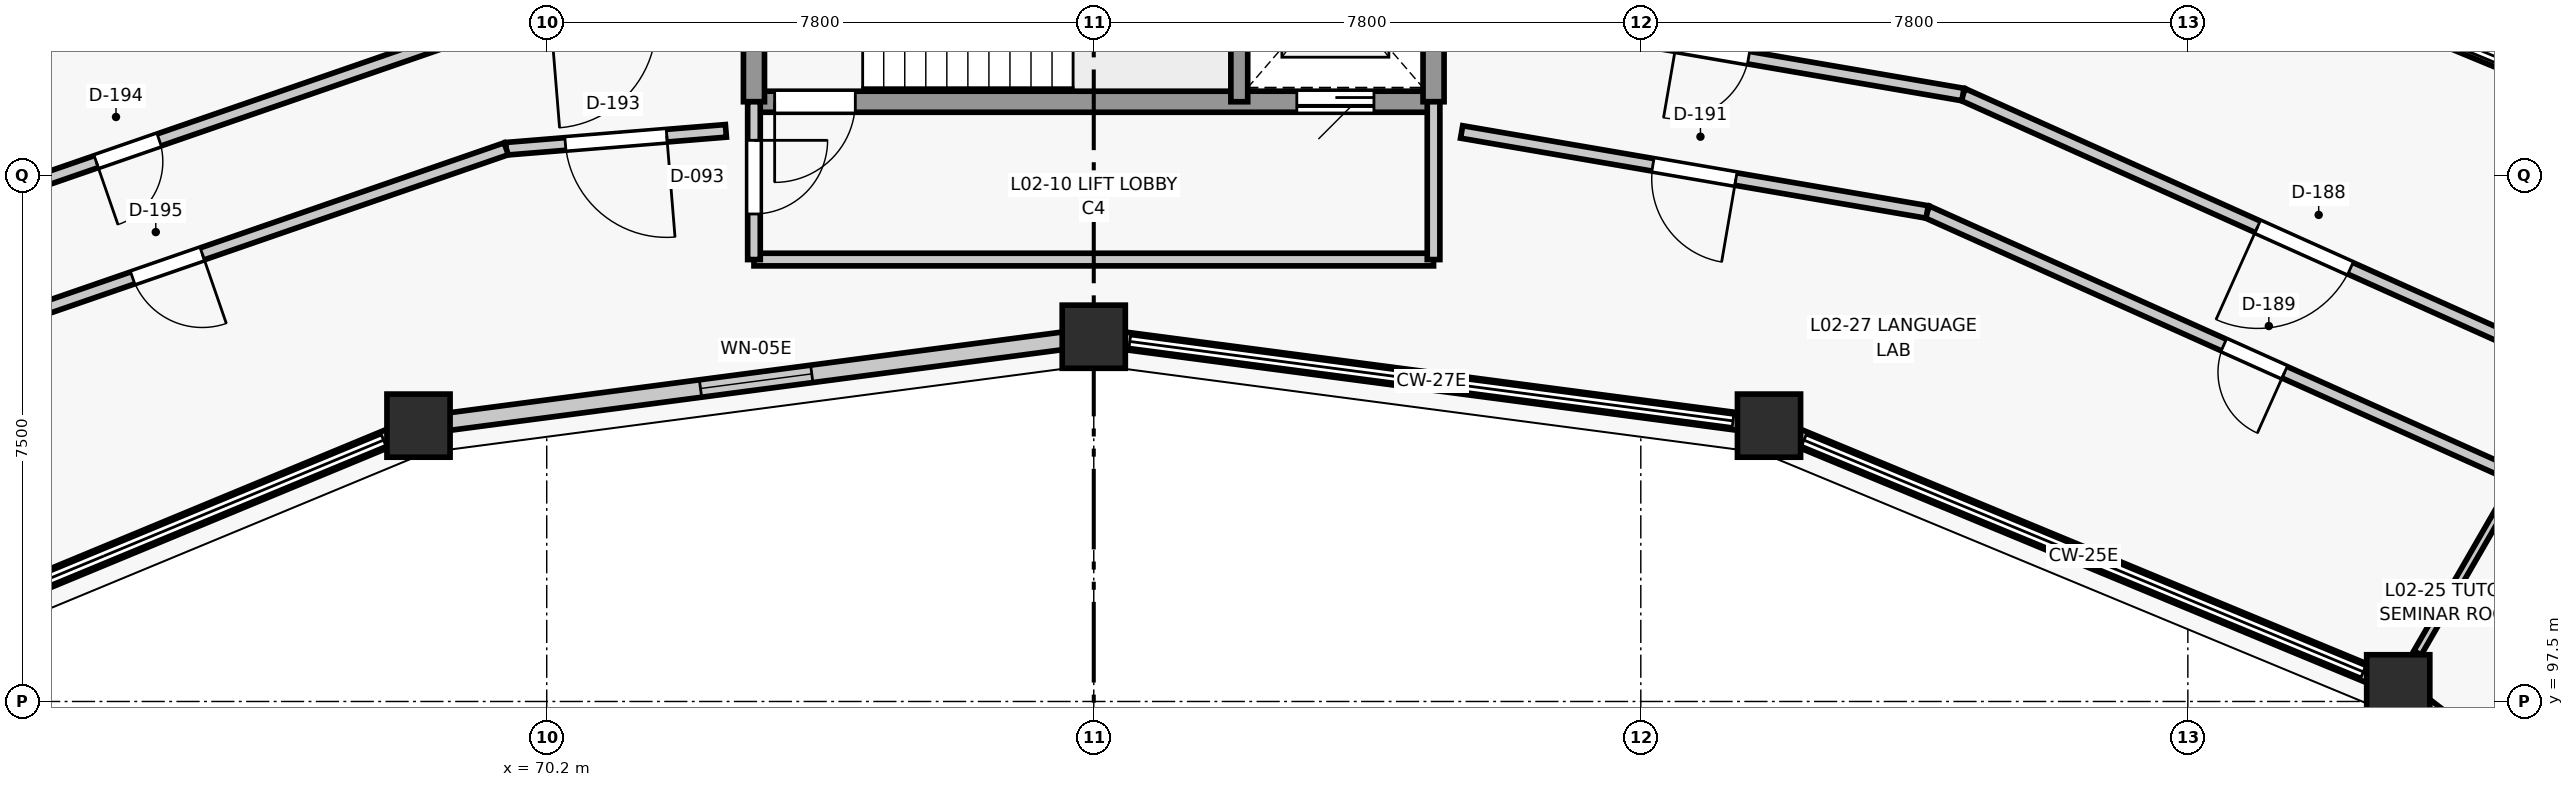
"""IFC4 building model, lengths in metres.
Left out: names, types, materials, properties, quantities, classifications, styles, units other than length and angle.
Written with IfcOpenShell. Run it as: python <this file> out.ifc"""

import sys

from ifc_helpers import new_model, si_unit, direction, frame, frame_2d, origin, origin_2d, place, context, subcontext, project, spatial, rectangle, circle, extrude, element, fill, save


model = new_model("IFC4")
c1 = context("Model", 3, precision=1e-05, world=origin(), true_north=direction((0.0, 1.0)))
c2 = subcontext(c1, "Body", "Model", "MODEL_VIEW")
j1 = project(units=[si_unit("LENGTHUNIT", "METRE"), si_unit("PLANEANGLEUNIT", "RADIAN")], contexts=[c1])
p1 = place(None, origin())
s1 = spatial("IfcSite", under=j1, at=p1, CompositionType="ELEMENT")
p2 = place(p1, origin())
s2 = spatial("IfcBuilding", under=s1, at=p2, CompositionType="ELEMENT")
p3 = place(p2, frame((0.0, 0.0, 8.7)))
s3 = spatial("IfcBuildingStorey", under=s2, at=p3, CompositionType="ELEMENT", Elevation=8.7)
for number, where, z_axis, x_axis in (
    (1, (96.6, 97.716, 0.0), (0.0, 0.0, 1.0), (1.0, 0.0, 0.0)),
    (2, (87.628, 101.432, 0.0), (0.0, 0.0, 1.0), (1.0, 0.0, 0.0)),
    (3, (78.0, 102.7, 0.0), (0.0, 0.0, 1.0), (1.0, 0.0, 0.0)),
    (4, (68.372, 101.432, 0.0), (0.0, 0.0, 1.0), (1.0, 0.0, 0.0)),
):
    element("IfcColumn", number, at=place(p3, frame(where, z_axis=z_axis, x_axis=x_axis)), inside=s3, PredefinedType="COLUMN", context=c2, shape_type="SweptSolid", body=[
        extrude(circle(Radius=0.45, at=origin_2d()), origin(), (0.0, 0.0, 1.0), 3.9),
    ])
p4 = place(p3, frame((104.024, 92.019, 0.0), z_axis=(0.0, 0.0, 1.0), x_axis=(-0.793347085527, 0.608769580289, 0.0)))
e5 = element("IfcWall", 5, at=p4, inside=s3, PredefinedType="STANDARD", context=c2, shape_type="SweptSolid", body=[
    extrude(rectangle(XDim=9.005, YDim=0.25, at=frame_2d((4.502, 0.0))), origin(), (0.0, 0.0, 1.0), 2.79),
])
p5 = place(p3, frame((90.283, 109.883, 0.0), z_axis=(0.0, 0.0, 1.0), x_axis=(0.923883530636, -0.382673779896, 0.0)))
e6 = element("IfcWall", 6, at=p5, inside=s3, PredefinedType="STANDARD", context=c2, shape_type="SweptSolid", body=[
    extrude(rectangle(XDim=11.272, YDim=0.28, at=frame_2d((5.636, 0.0))), origin(), (0.0, 0.0, 1.0), 0.82),
])
p6 = place(p3, frame((96.323, 97.831, 0.0), z_axis=(0.0, 0.0, 1.0), x_axis=(-0.923880324771, 0.382681519675, 0.0)))
e7 = element("IfcWall", 7, at=p6, inside=s3, PredefinedType="STANDARD", context=c2, shape_type="SweptSolid", body=[
    extrude(rectangle(XDim=9.112, YDim=0.25, at=frame_2d((4.556, 0.0))), origin(), (0.0, 0.0, 1.0), 0.82),
])
p7 = place(p3, frame((87.353, 101.469, 0.0), z_axis=(0.0, 0.0, 1.0), x_axis=(-0.991441766434, 0.130549698469, 0.0)))
e8 = element("IfcWall", 8, at=p7, inside=s3, PredefinedType="STANDARD", context=c2, shape_type="SweptSolid", body=[
    extrude(rectangle(XDim=9.156, YDim=0.25, at=frame_2d((4.578, 0.0))), origin(), (0.0, 0.0, 1.0), 0.82),
])
p8 = place(p3, frame((77.725, 102.664, 0.0), z_axis=(0.0, 0.0, 1.0), x_axis=(-0.991441766434, -0.130549698469, 0.0)))
e9 = element("IfcWall", 9, at=p8, inside=s3, PredefinedType="STANDARD", context=c2, shape_type="SweptSolid", body=[
    extrude(rectangle(XDim=9.156, YDim=0.25, at=frame_2d((4.578, 0.0))), origin(), (0.0, 0.0, 1.0), 2.79),
])
p9 = place(p8, frame((3.778, 0.0, 0.85)))
e10 = element("IfcOpeningElement", 10, at=p9, cuts=e9, PredefinedType="OPENING", context=c2, shape_type="SweptSolid", body=[
    extrude(rectangle(XDim=1.6, YDim=1.4, at=frame_2d((0.8, 0.7))), frame((0.0, 0.135, 0.0), z_axis=(0.0, -1.0, 0.0), x_axis=(1.0, 0.0, 0.0)), (0.0, 0.0, 1.0), 0.27),
])
p10 = place(p3, frame((55.302, 105.57, 0.0), z_axis=(0.0, 0.0, 1.0), x_axis=(0.923883530636, 0.382673779896, 0.0)))
e11 = element("IfcWall", 11, at=p10, inside=s3, PredefinedType="STANDARD", context=c2, shape_type="SweptSolid", body=[
    extrude(rectangle(XDim=11.272, YDim=0.28, at=frame_2d((5.636, 0.0))), origin(), (0.0, 0.0, 1.0), 2.706),
])
p11 = place(p10, frame((4.736, 0.0, 0.85)))
e12 = element("IfcOpeningElement", 12, at=p11, cuts=e11, PredefinedType="OPENING", context=c2, shape_type="SweptSolid", body=[
    extrude(rectangle(XDim=1.8, YDim=1.4, at=frame_2d((0.9, 0.7))), frame((0.0, 0.15, 0.0), z_axis=(0.0, -1.0, 0.0), x_axis=(1.0, 0.0, 0.0)), (0.0, 0.0, 1.0), 0.3),
])
p12 = place(p3, frame((68.095, 101.318, 0.0), z_axis=(0.0, 0.0, 1.0), x_axis=(-0.923880324771, -0.382681519675, 0.0)))
e13 = element("IfcWall", 13, at=p12, inside=s3, PredefinedType="STANDARD", context=c2, shape_type="SweptSolid", body=[
    extrude(rectangle(XDim=9.112, YDim=0.25, at=frame_2d((4.556, 0.0))), origin(), (0.0, 0.0, 1.0), 0.82),
])
p13 = place(p3, frame((82.845, 106.05, 0.0), z_axis=(0.0, 0.0, 1.0), x_axis=(-1.0, 0.0, 0.0)))
e14 = element("IfcWall", 14, at=p13, inside=s3, PredefinedType="SHEAR", context=c2, shape_type="SweptSolid", body=[
    extrude(rectangle(XDim=9.69, YDim=0.3, at=frame_2d((4.845, 0.0))), origin(), (0.0, 0.0, 1.0), 3.9),
])
p14 = place(p13, frame((8.245, 0.0, 0.0)))
e15 = element("IfcOpeningElement", 15, at=p14, cuts=e14, PredefinedType="OPENING", context=c2, shape_type="SweptSolid", body=[
    extrude(rectangle(XDim=1.15, YDim=2.15, at=frame_2d((0.575, 1.075))), frame((0.0, 0.16, 0.0), z_axis=(0.0, -1.0, 0.0), x_axis=(1.0, 0.0, 0.0)), (0.0, 0.0, 1.0), 0.32),
])
p15 = place(p13, frame((0.85, 0.0, 0.0)))
e16 = element("IfcOpeningElement", 16, at=p15, cuts=e14, PredefinedType="OPENING", context=c2, shape_type="SweptSolid", body=[
    extrude(rectangle(XDim=1.1, YDim=2.15, at=frame_2d((0.55, 1.075))), frame((0.0, 0.16, 0.0), z_axis=(0.0, -1.0, 0.0), x_axis=(1.0, 0.0, 0.0)), (0.0, 0.0, 1.0), 0.32),
])
for number, where, z_axis, x_axis in (
    (17, (73.155, 106.05, 0.0), (0.0, 0.0, 1.0), (0.0, 1.0, 0.0)),
    (18, (82.845, 109.35, 0.0), (0.0, 0.0, 1.0), (0.0, -1.0, 0.0)),
):
    element("IfcWall", number, at=place(p3, frame(where, z_axis=z_axis, x_axis=x_axis)), inside=s3, PredefinedType="SHEAR", context=c2, shape_type="SweptSolid", body=[
        extrude(rectangle(XDim=3.3, YDim=0.3, at=frame_2d((1.65, 0.0))), origin(), (0.0, 0.0, 1.0), 3.9),
    ])
p16 = place(p3, frame((80.075, 106.05, 0.0), z_axis=(0.0, 0.0, 1.0), x_axis=(0.0, 1.0, 0.0)))
e19 = element("IfcWall", 19, at=p16, inside=s3, PredefinedType="SHEAR", context=c2, shape_type="SweptSolid", body=[
    extrude(rectangle(XDim=3.3, YDim=0.24, at=frame_2d((1.65, 0.0))), origin(), (0.0, 0.0, 1.0), 3.9),
])
p17 = place(p3, frame((73.155, 103.8, 0.0), z_axis=(0.0, 0.0, 1.0), x_axis=(1.0, 0.0, 0.0)))
e20 = element("IfcWall", 20, at=p17, inside=s3, PredefinedType="PARTITIONING", context=c2, shape_type="SweptSolid", body=[
    extrude(rectangle(XDim=9.69, YDim=0.18, at=frame_2d((4.845, 0.0))), origin(), (0.0, 0.0, 1.0), 3.495),
])
p18 = place(p3, frame((73.155, 106.05, 0.0), z_axis=(0.0, 0.0, 1.0), x_axis=(0.0, -1.0, 0.0)))
e21 = element("IfcWall", 21, at=p18, inside=s3, PredefinedType="PARTITIONING", context=c2, shape_type="SweptSolid", body=[
    extrude(rectangle(XDim=2.25, YDim=0.18, at=frame_2d((1.125, 0.0))), origin(), (0.0, 0.0, 1.0), 3.495),
])
p19 = place(p18, frame((0.55, 0.0, 0.0)))
e22 = element("IfcOpeningElement", 22, at=p19, cuts=e21, PredefinedType="OPENING", context=c2, shape_type="SweptSolid", body=[
    extrude(rectangle(XDim=1.05, YDim=2.1, at=frame_2d((0.525, 1.05))), frame((0.0, 0.1, 0.0), z_axis=(0.0, -1.0, 0.0), x_axis=(1.0, 0.0, 0.0)), (0.0, 0.0, 1.0), 0.2),
])
p20 = place(p3, frame((82.845, 106.05, 0.0), z_axis=(0.0, 0.0, 1.0), x_axis=(0.0, -1.0, 0.0)))
e23 = element("IfcWall", 23, at=p20, inside=s3, PredefinedType="PARTITIONING", context=c2, shape_type="SweptSolid", body=[
    extrude(rectangle(XDim=2.25, YDim=0.18, at=frame_2d((1.125, 0.0))), origin(), (0.0, 0.0, 1.0), 3.495),
])
p21 = place(p3, frame((100.12, 101.79, 0.0), z_axis=(0.0, 0.0, 1.0), x_axis=(-0.912414084207, 0.409268297015, 0.0)))
e24 = element("IfcWall", 24, at=p21, inside=s3, PredefinedType="PARTITIONING", context=c2, shape_type="SweptSolid", body=[
    extrude(rectangle(XDim=10.66, YDim=0.18, at=frame_2d((5.33, 0.0))), origin(), (0.0, 0.0, 1.0), 3.495),
])
p22 = place(p21, frame((4.605, 0.0, 0.0)))
e25 = element("IfcOpeningElement", 25, at=p22, cuts=e24, PredefinedType="OPENING", context=c2, shape_type="SweptSolid", body=[
    extrude(rectangle(XDim=1.45, YDim=2.2, at=frame_2d((0.725, 1.1))), frame((0.0, 0.1, 0.0), z_axis=(0.0, -1.0, 0.0), x_axis=(1.0, 0.0, 0.0)), (0.0, 0.0, 1.0), 0.2),
])
p23 = place(p3, frame((99.209, 100.296, 0.0), z_axis=(0.0, 0.0, 1.0), x_axis=(-0.912404455482, 0.409289762414, 0.0)))
e26 = element("IfcWall", 26, at=p23, inside=s3, PredefinedType="PARTITIONING", context=c2, shape_type="SweptSolid", body=[
    extrude(rectangle(XDim=10.221, YDim=0.18, at=frame_2d((5.11, 0.0))), origin(), (0.0, 0.0, 1.0), 3.495),
])
p24 = place(p23, frame((4.635, 0.0, 0.0)))
e27 = element("IfcOpeningElement", 27, at=p24, cuts=e26, PredefinedType="OPENING", context=c2, shape_type="SweptSolid", body=[
    extrude(rectangle(XDim=0.95, YDim=2.1, at=frame_2d((0.475, 1.05))), frame((0.0, 0.1, 0.0), z_axis=(0.0, -1.0, 0.0), x_axis=(1.0, 0.0, 0.0)), (0.0, 0.0, 1.0), 0.2),
])
p25 = place(p3, frame((90.394, 106.153, 0.0), z_axis=(0.0, 0.0, 1.0), x_axis=(-0.985557318444, 0.169342174491, 0.0)))
e28 = element("IfcWall", 28, at=p25, inside=s3, PredefinedType="PARTITIONING", context=c2, shape_type="SweptSolid", body=[
    extrude(rectangle(XDim=7.253, YDim=0.18, at=frame_2d((3.626, 0.0))), origin(), (0.0, 0.0, 1.0), 3.495),
])
p26 = place(p25, frame((3.102, 0.0, 0.0)))
e29 = element("IfcOpeningElement", 29, at=p26, cuts=e28, PredefinedType="OPENING", context=c2, shape_type="SweptSolid", body=[
    extrude(rectangle(XDim=1.05, YDim=2.1, at=frame_2d((0.525, 1.05))), frame((0.0, 0.1, 0.0), z_axis=(0.0, -1.0, 0.0), x_axis=(1.0, 0.0, 0.0)), (0.0, 0.0, 1.0), 0.2),
])
p27 = place(p3, frame((89.883, 104.479, 0.0), z_axis=(0.0, 0.0, 1.0), x_axis=(-0.98556269187, 0.169310898629, 0.0)))
e30 = element("IfcWall", 30, at=p27, inside=s3, PredefinedType="PARTITIONING", context=c2, shape_type="SweptSolid", body=[
    extrude(rectangle(XDim=6.735, YDim=0.18, at=frame_2d((3.368, 0.0))), origin(), (0.0, 0.0, 1.0), 3.495),
])
p28 = place(p27, frame((2.768, 0.0, 0.0)))
e31 = element("IfcOpeningElement", 31, at=p28, cuts=e30, PredefinedType="OPENING", context=c2, shape_type="SweptSolid", body=[
    extrude(rectangle(XDim=1.2, YDim=2.15, at=frame_2d((0.6, 1.075))), frame((0.0, 0.1, 0.0), z_axis=(0.0, -1.0, 0.0), x_axis=(1.0, 0.0, 0.0)), (0.0, 0.0, 1.0), 0.2),
])
p29 = place(p3, frame((72.755, 105.635, 0.0), z_axis=(0.0, 0.0, 1.0), x_axis=(-0.996693095602, -0.081258065316, 0.0)))
e32 = element("IfcWall", 32, at=p29, inside=s3, PredefinedType="PARTITIONING", context=c2, shape_type="SweptSolid", body=[
    extrude(rectangle(XDim=3.143, YDim=0.18, at=frame_2d((1.571, 0.0))), origin(), (0.0, 0.0, 1.0), 3.495),
])
p30 = place(p29, frame((0.846, 0.0, 0.0)))
e33 = element("IfcOpeningElement", 33, at=p30, cuts=e32, PredefinedType="OPENING", context=c2, shape_type="SweptSolid", body=[
    extrude(rectangle(XDim=1.45, YDim=2.2, at=frame_2d((0.725, 1.1))), frame((0.0, 0.1, 0.0), z_axis=(0.0, -1.0, 0.0), x_axis=(1.0, 0.0, 0.0)), (0.0, 0.0, 1.0), 0.2),
])
p31 = place(p3, frame((69.263, 107.092, 0.0), z_axis=(0.0, 0.0, 1.0), x_axis=(-0.945128117061, -0.326699927059, 0.0)))
e34 = element("IfcWall", 34, at=p31, inside=s3, PredefinedType="PARTITIONING", context=c2, shape_type="SweptSolid", body=[
    extrude(rectangle(XDim=10.66, YDim=0.18, at=frame_2d((5.33, 0.0))), origin(), (0.0, 0.0, 1.0), 3.495),
])
p32 = place(p31, frame((4.855, 0.0, 0.0)))
e35 = element("IfcOpeningElement", 35, at=p32, cuts=e34, PredefinedType="OPENING", context=c2, shape_type="SweptSolid", body=[
    extrude(rectangle(XDim=0.95, YDim=2.1, at=frame_2d((0.475, 1.05))), frame((0.0, 0.1, 0.0), z_axis=(0.0, -1.0, 0.0), x_axis=(1.0, 0.0, 0.0)), (0.0, 0.0, 1.0), 0.2),
])
p33 = place(p3, frame((69.623, 105.38, 0.0), z_axis=(0.0, 0.0, 1.0), x_axis=(-0.945125986937, -0.326706089346, 0.0)))
e36 = element("IfcWall", 36, at=p33, inside=s3, PredefinedType="PARTITIONING", context=c2, shape_type="SweptSolid", body=[
    extrude(rectangle(XDim=10.221, YDim=0.18, at=frame_2d((5.111, 0.0))), origin(), (0.0, 0.0, 1.0), 3.495),
])
p34 = place(p33, frame((4.586, 0.0, 0.0)))
e37 = element("IfcOpeningElement", 37, at=p34, cuts=e36, PredefinedType="OPENING", context=c2, shape_type="SweptSolid", body=[
    extrude(rectangle(XDim=1.05, YDim=2.1, at=frame_2d((0.525, 1.05))), frame((0.0, 0.1, 0.0), z_axis=(0.0, -1.0, 0.0), x_axis=(1.0, 0.0, 0.0)), (0.0, 0.0, 1.0), 0.2),
])
p35 = place(p3, frame((96.875, 98.192, 0.0), z_axis=(0.0, 0.0, 1.0), x_axis=(0.499990139034, 0.866031096941, 0.0)))
e38 = element("IfcWall", 38, at=p35, inside=s3, PredefinedType="PARTITIONING", context=c2, shape_type="SweptSolid", body=[
    extrude(rectangle(XDim=3.0, YDim=0.12, at=frame_2d((1.5, 0.0))), origin(), (0.0, 0.0, 1.0), 2.857),
])
p36 = place(p9, origin())
e39 = element("IfcWindow", 39, at=p36, inside=s3, PartitioningType="SINGLE_PANEL", PredefinedType="WINDOW", context=c2, shape_type="SweptSolid", body=[
    extrude(rectangle(XDim=1.6, YDim=1.4, at=frame_2d((0.8, 0.7))), frame((0.0, 0.03, 0.0), z_axis=(0.0, -1.0, 0.0), x_axis=(1.0, 0.0, 0.0)), (0.0, 0.0, 1.0), 0.06),
])
fill(e10, e39)
p37 = place(p14, origin())
e40 = element("IfcDoor", 40, at=p37, inside=s3, OperationType="SINGLE_SWING_RIGHT", PredefinedType="DOOR", context=c2, shape_type="SweptSolid", body=[
    extrude(rectangle(XDim=1.15, YDim=2.15, at=frame_2d((0.575, 1.075))), frame((0.0, 0.025, 0.0), z_axis=(0.0, -1.0, 0.0), x_axis=(1.0, 0.0, 0.0)), (0.0, 0.0, 1.0), 0.05),
])
fill(e15, e40)
p38 = place(p15, origin())
e41 = element("IfcDoor", 41, at=p38, inside=s3, OperationType="SLIDING_TO_LEFT", PredefinedType="DOOR", context=c2, shape_type="SweptSolid", body=[
    extrude(rectangle(XDim=1.1, YDim=2.15, at=frame_2d((0.55, 1.075))), frame((0.0, 0.025, 0.0), z_axis=(0.0, -1.0, 0.0), x_axis=(1.0, 0.0, 0.0)), (0.0, 0.0, 1.0), 0.05),
])
fill(e16, e41)
p39 = place(p19, origin())
e42 = element("IfcDoor", 42, at=p39, inside=s3, OperationType="SINGLE_SWING_LEFT", PredefinedType="DOOR", context=c2, shape_type="SweptSolid", body=[
    extrude(rectangle(XDim=1.05, YDim=2.1, at=frame_2d((0.525, 1.05))), frame((0.0, 0.025, 0.0), z_axis=(0.0, -1.0, 0.0), x_axis=(1.0, 0.0, 0.0)), (0.0, 0.0, 1.0), 0.05),
])
fill(e22, e42)
p40 = place(p22, origin())
e43 = element("IfcDoor", 43, at=p40, inside=s3, OperationType="SINGLE_SWING_RIGHT", PredefinedType="DOOR", context=c2, shape_type="SweptSolid", body=[
    extrude(rectangle(XDim=1.45, YDim=2.2, at=frame_2d((0.725, 1.1))), frame((0.0, 0.025, 0.0), z_axis=(0.0, -1.0, 0.0), x_axis=(1.0, 0.0, 0.0)), (0.0, 0.0, 1.0), 0.05),
])
fill(e25, e43)
p41 = place(p24, origin())
e44 = element("IfcDoor", 44, at=p41, inside=s3, OperationType="SINGLE_SWING_LEFT", PredefinedType="DOOR", context=c2, shape_type="SweptSolid", body=[
    extrude(rectangle(XDim=0.95, YDim=2.1, at=frame_2d((0.475, 1.05))), frame((0.0, 0.025, 0.0), z_axis=(0.0, -1.0, 0.0), x_axis=(1.0, 0.0, 0.0)), (0.0, 0.0, 1.0), 0.05),
])
fill(e27, e44)
p42 = place(p26, origin())
e45 = element("IfcDoor", 45, at=p42, inside=s3, OperationType="SINGLE_SWING_RIGHT", PredefinedType="DOOR", context=c2, shape_type="SweptSolid", body=[
    extrude(rectangle(XDim=1.05, YDim=2.1, at=frame_2d((0.525, 1.05))), frame((0.0, 0.025, 0.0), z_axis=(0.0, -1.0, 0.0), x_axis=(1.0, 0.0, 0.0)), (0.0, 0.0, 1.0), 0.05),
])
fill(e29, e45)
p43 = place(p28, origin())
e46 = element("IfcDoor", 46, at=p43, inside=s3, OperationType="SINGLE_SWING_LEFT", PredefinedType="DOOR", context=c2, shape_type="SweptSolid", body=[
    extrude(rectangle(XDim=1.2, YDim=2.15, at=frame_2d((0.6, 1.075))), frame((0.0, 0.025, 0.0), z_axis=(0.0, -1.0, 0.0), x_axis=(1.0, 0.0, 0.0)), (0.0, 0.0, 1.0), 0.05),
])
fill(e31, e46)
p44 = place(p30, origin())
e47 = element("IfcDoor", 47, at=p44, inside=s3, OperationType="SINGLE_SWING_LEFT", PredefinedType="DOOR", context=c2, shape_type="SweptSolid", body=[
    extrude(rectangle(XDim=1.45, YDim=2.2, at=frame_2d((0.725, 1.1))), frame((0.0, 0.025, 0.0), z_axis=(0.0, -1.0, 0.0), x_axis=(1.0, 0.0, 0.0)), (0.0, 0.0, 1.0), 0.05),
])
fill(e33, e47)
p45 = place(p32, origin())
e48 = element("IfcDoor", 48, at=p45, inside=s3, OperationType="SINGLE_SWING_RIGHT", PredefinedType="DOOR", context=c2, shape_type="SweptSolid", body=[
    extrude(rectangle(XDim=0.95, YDim=2.1, at=frame_2d((0.475, 1.05))), frame((0.0, 0.025, 0.0), z_axis=(0.0, -1.0, 0.0), x_axis=(1.0, 0.0, 0.0)), (0.0, 0.0, 1.0), 0.05),
])
fill(e35, e48)
p46 = place(p34, origin())
e49 = element("IfcDoor", 49, at=p46, inside=s3, OperationType="SINGLE_SWING_LEFT", PredefinedType="DOOR", context=c2, shape_type="SweptSolid", body=[
    extrude(rectangle(XDim=1.05, YDim=2.1, at=frame_2d((0.525, 1.05))), frame((0.0, 0.025, 0.0), z_axis=(0.0, -1.0, 0.0), x_axis=(1.0, 0.0, 0.0)), (0.0, 0.0, 1.0), 0.05),
])
fill(e37, e49)
save(model, sys.argv[1])
